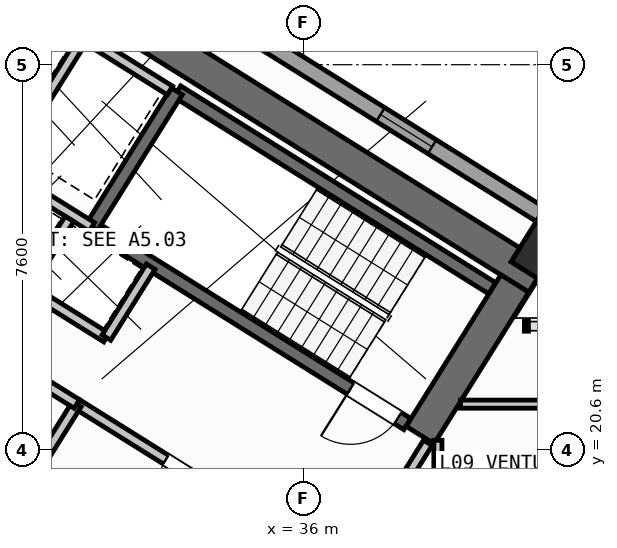
"""IFC4 building model, lengths in metres.
Left out: names, types, materials, properties, quantities, classifications, styles, units other than length and angle.
Written with IfcOpenShell. Run it as: python <this file> out.ifc"""

import sys

from ifc_helpers import new_model, si_unit, direction, frame, frame_2d, origin, origin_2d, place, context, subcontext, project, spatial, rectangle, hollow_rectangle, extrude, source, transform, mapped, element, fill, save


model = new_model("IFC4")
c1 = context("Model", 3, precision=1e-05, world=origin(), true_north=direction((0.0, 1.0)))
c2 = subcontext(c1, "Body", "Model", "MODEL_VIEW")
j1 = project(units=[si_unit("LENGTHUNIT", "METRE"), si_unit("PLANEANGLEUNIT", "RADIAN")], contexts=[c1])
p1 = place(None, origin())
s1 = spatial("IfcSite", under=j1, at=p1, CompositionType="ELEMENT")
p2 = place(p1, origin())
s2 = spatial("IfcBuilding", under=s1, at=p2, CompositionType="ELEMENT")
p3 = place(p2, frame((0.0, 0.0, 38.4)))
s3 = spatial("IfcBuildingStorey", under=s2, at=p3, CompositionType="ELEMENT", Elevation=38.4)
p4 = place(p3, frame((40.615, 23.983, 0.0), z_axis=(0.0, 0.0, 1.0), x_axis=(-0.848045953968, 0.529922692436, 0.0)))
e1 = element("IfcWall", 1, at=p4, inside=s3, PredefinedType="SHEAR", context=c2, shape_type="SweptSolid", body=[
    extrude(rectangle(XDim=13.24, YDim=0.65, at=frame_2d((6.62, 0.0))), origin(), (0.0, 0.0, 1.0), 3.35),
])
p5 = place(p3, frame((40.168, 23.88, 0.0), z_axis=(0.0, 0.0, 1.0), x_axis=(-0.529893103397, -0.8480644427, 0.0)))
e2 = element("IfcWall", 2, at=p5, inside=s3, PredefinedType="SHEAR", context=c2, shape_type="SweptSolid", body=[
    extrude(rectangle(XDim=3.525, YDim=0.65, at=frame_2d((1.763, 0.0))), origin(), (0.0, 0.0, 1.0), 3.35),
])
m1 = source(origin(), c2, "Body", "SweptSolid", [
    extrude(hollow_rectangle(XDim=1.0, YDim=1.0, WallThickness=0.04, at=origin_2d()), origin(), (0.0, 0.0, 1.0), 3.6),
])
p6 = place(p3, frame((40.783, 24.469, 0.0), z_axis=(0.0, 0.0, 1.0), x_axis=(-0.848048096156, 0.529919264233, 0.0)))
e3 = element("IfcColumn", 3, at=p6, inside=s3, PredefinedType="COLUMN", context=c2, shape_type="MappedRepresentation", body=[
    mapped(m1, transform((0.0, 0.0, 0.0), scale=1.0)),
])
p7 = place(p3, frame((14.138, 41.825, 0.0), z_axis=(0.0, 0.0, 1.0), x_axis=(0.848046498049, -0.529921821731, 0.0)))
e4 = element("IfcWall", 4, at=p7, inside=s3, PredefinedType="STANDARD", context=c2, shape_type="SweptSolid", body=[
    extrude(rectangle(XDim=31.588, YDim=0.32, at=frame_2d((15.794, 0.0))), origin(), (0.0, 0.0, 1.0), 3.35),
])
p8 = place(p7, frame((3.369, 0.0, 0.0)))
e5 = element("IfcOpeningElement", 5, at=p8, cuts=e4, PredefinedType="OPENING", context=c2, shape_type="SweptSolid", body=[
    extrude(rectangle(XDim=1.05, YDim=2.15, at=frame_2d((0.525, 1.075))), frame((0.0, 0.17, 0.0), z_axis=(0.0, -1.0, 0.0), x_axis=(1.0, 0.0, 0.0)), (0.0, 0.0, 1.0), 0.34),
])
p9 = place(p7, frame((0.946, 0.0, 0.85)))
e6 = element("IfcOpeningElement", 6, at=p9, cuts=e4, PredefinedType="OPENING", context=c2, shape_type="SweptSolid", body=[
    extrude(rectangle(XDim=1.8, YDim=1.5, at=frame_2d((0.9, 0.75))), frame((0.0, 0.17, 0.0), z_axis=(0.0, -1.0, 0.0), x_axis=(1.0, 0.0, 0.0)), (0.0, 0.0, 1.0), 0.34),
])
p10 = place(p7, frame((8.46, 0.0, 0.85)))
e7 = element("IfcOpeningElement", 7, at=p10, cuts=e4, PredefinedType="OPENING", context=c2, shape_type="SweptSolid", body=[
    extrude(rectangle(XDim=1.8, YDim=1.5, at=frame_2d((0.9, 0.75))), frame((0.0, 0.17, 0.0), z_axis=(0.0, -1.0, 0.0), x_axis=(1.0, 0.0, 0.0)), (0.0, 0.0, 1.0), 0.34),
])
p11 = place(p7, frame((13.899, 0.0, 0.85)))
e8 = element("IfcOpeningElement", 8, at=p11, cuts=e4, PredefinedType="OPENING", context=c2, shape_type="SweptSolid", body=[
    extrude(rectangle(XDim=1.5, YDim=1.5, at=frame_2d((0.75, 0.75))), frame((0.0, 0.17, 0.0), z_axis=(0.0, -1.0, 0.0), x_axis=(1.0, 0.0, 0.0)), (0.0, 0.0, 1.0), 0.34),
])
p12 = place(p7, frame((22.019, 0.0, 0.95)))
e9 = element("IfcOpeningElement", 9, at=p12, cuts=e4, PredefinedType="OPENING", context=c2, shape_type="SweptSolid", body=[
    extrude(rectangle(XDim=1.2, YDim=1.4, at=frame_2d((0.6, 0.7))), frame((0.0, 0.17, 0.0), z_axis=(0.0, -1.0, 0.0), x_axis=(1.0, 0.0, 0.0)), (0.0, 0.0, 1.0), 0.34),
])
p13 = place(p7, frame((27.569, 0.0, 0.95)))
e10 = element("IfcOpeningElement", 10, at=p13, cuts=e4, PredefinedType="OPENING", context=c2, shape_type="SweptSolid", body=[
    extrude(rectangle(XDim=1.2, YDim=1.4, at=frame_2d((0.6, 0.7))), frame((0.0, 0.17, 0.0), z_axis=(0.0, -1.0, 0.0), x_axis=(1.0, 0.0, 0.0)), (0.0, 0.0, 1.0), 0.34),
])
p14 = place(p3, frame((31.28, 18.261, 0.0), z_axis=(0.0, 0.0, 1.0), x_axis=(-0.848051618787, 0.529913626805, 0.0)))
e11 = element("IfcWall", 11, at=p14, inside=s3, PredefinedType="SHEAR", context=c2, shape_type="SweptSolid", body=[
    extrude(rectangle(XDim=7.46, YDim=0.26, at=frame_2d((3.73, 0.0))), origin(), (0.0, 0.0, 1.0), 3.35),
])
p15 = place(p14, frame((0.36, 0.0, 0.0)))
e12 = element("IfcOpeningElement", 12, at=p15, cuts=e11, PredefinedType="OPENING", context=c2, shape_type="SweptSolid", body=[
    extrude(rectangle(XDim=0.86, YDim=2.05, at=frame_2d((0.43, 1.025))), frame((0.0, 0.14, 0.0), z_axis=(0.0, -1.0, 0.0), x_axis=(1.0, 0.0, 0.0)), (0.0, 0.0, 1.0), 0.28),
])
p16 = place(p3, frame((39.721, 23.788, 0.0), z_axis=(0.0, 0.0, 1.0), x_axis=(-0.848054434086, 0.529909121291, 0.0)))
e13 = element("IfcWall", 13, at=p16, inside=s3, PredefinedType="SHEAR", context=c2, shape_type="SweptSolid", body=[
    extrude(rectangle(XDim=7.33, YDim=0.26, at=frame_2d((3.665, 0.0))), origin(), (0.0, 0.0, 1.0), 3.35),
])
p17 = place(p3, frame((38.046, 21.108, 0.0), z_axis=(0.0, 0.0, 1.0), x_axis=(-0.848054434086, 0.529909121291, 0.0)))
e14 = element("IfcWall", 14, at=p17, inside=s3, PredefinedType="SHEAR", context=c2, shape_type="SweptSolid", body=[
    extrude(rectangle(XDim=7.33, YDim=0.26, at=frame_2d((3.665, 0.0))), origin(), (0.0, 0.0, 1.0), 3.35),
])
p18 = place(p17, frame((0.22, 0.0, 0.0)))
e15 = element("IfcOpeningElement", 15, at=p18, cuts=e14, PredefinedType="OPENING", context=c2, shape_type="SweptSolid", body=[
    extrude(rectangle(XDim=1.1, YDim=2.1, at=frame_2d((0.55, 1.05))), frame((0.0, 0.14, 0.0), z_axis=(0.0, -1.0, 0.0), x_axis=(1.0, 0.0, 0.0)), (0.0, 0.0, 1.0), 0.28),
])
p19 = place(p3, frame((33.496, 27.677, 0.0), z_axis=(0.0, 0.0, 1.0), x_axis=(-0.529908658664, -0.84805472316, 0.0)))
e16 = element("IfcWall", 16, at=p19, inside=s3, PredefinedType="SHEAR", context=c2, shape_type="SweptSolid", body=[
    extrude(rectangle(XDim=3.16, YDim=0.26, at=frame_2d((1.58, 0.0))), origin(), (0.0, 0.0, 1.0), 3.35),
])
p20 = place(p3, frame((36.374, 18.474, 0.0), z_axis=(0.0, 0.0, 1.0), x_axis=(-0.848051071577, 0.529914502535, 0.0)))
e17 = element("IfcWall", 17, at=p20, inside=s3, PredefinedType="STANDARD", context=c2, shape_type="SweptSolid", body=[
    extrude(rectangle(XDim=5.718, YDim=0.2, at=frame_2d((2.859, 0.0))), origin(), (0.0, 0.0, 1.0), 3.34),
])
p21 = place(p20, frame((2.498, 0.0, 0.0)))
e18 = element("IfcOpeningElement", 18, at=p21, cuts=e17, PredefinedType="OPENING", context=c2, shape_type="SweptSolid", body=[
    extrude(rectangle(XDim=1.15, YDim=2.1, at=frame_2d((0.575, 1.05))), frame((0.0, 0.11, 0.0), z_axis=(0.0, -1.0, 0.0), x_axis=(1.0, 0.0, 0.0)), (0.0, 0.0, 1.0), 0.22),
])
p22 = place(p3, frame((31.822, 24.998, 0.0), z_axis=(0.0, 0.0, 1.0), x_axis=(-0.848058348634, 0.529902856485, 0.0)))
e19 = element("IfcWall", 19, at=p22, inside=s3, PredefinedType="STANDARD", context=c2, shape_type="SweptSolid", body=[
    extrude(rectangle(XDim=4.568, YDim=0.2, at=frame_2d((2.284, 0.0))), origin(), (0.0, 0.0, 1.0), 3.34),
])
p23 = place(p3, frame((32.108, 22.814, 0.0), z_axis=(0.0, 0.0, 1.0), x_axis=(-0.848042229521, 0.529928652696, 0.0)))
e20 = element("IfcWall", 20, at=p23, inside=s3, PredefinedType="STANDARD", context=c2, shape_type="SweptSolid", body=[
    extrude(rectangle(XDim=5.62, YDim=0.2, at=frame_2d((2.81, 0.0))), origin(), (0.0, 0.0, 1.0), 3.34),
])
p24 = place(p3, frame((32.982, 24.213, 0.0), z_axis=(0.0, 0.0, 1.0), x_axis=(-0.529839334948, -0.84809803628, 0.0)))
e21 = element("IfcWall", 21, at=p24, inside=s3, PredefinedType="STANDARD", context=c2, shape_type="SweptSolid", body=[
    extrude(rectangle(XDim=1.65, YDim=0.2, at=frame_2d((0.825, 0.0))), origin(), (0.0, 0.0, 1.0), 3.34),
])
p25 = place(p3, frame((31.645, 28.716, 0.0), z_axis=(0.0, 0.0, 1.0), x_axis=(-0.52986693015, -0.848080795876, 0.0)))
e22 = element("IfcWall", 22, at=p25, inside=s3, PredefinedType="STANDARD", context=c2, shape_type="SweptSolid", body=[
    extrude(rectangle(XDim=2.66, YDim=0.2, at=frame_2d((1.33, 0.0))), origin(), (0.0, 0.0, 1.0), 3.34),
])
p26 = place(p3, frame((33.363, 27.69, 0.0), z_axis=(0.0, 0.0, 1.0), x_axis=(-0.848053806312, 0.529910125964, 0.0)))
e23 = element("IfcWall", 23, at=p26, inside=s3, PredefinedType="STANDARD", context=c2, shape_type="SweptSolid", body=[
    extrude(rectangle(XDim=4.448, YDim=0.2, at=frame_2d((2.224, 0.0))), origin(), (0.0, 0.0, 1.0), 3.34),
])
p27 = place(p3, frame((31.379, 25.156, 0.0), z_axis=(0.0, 0.0, 1.0), x_axis=(-0.529998940003, -0.847998304005, 0.0)))
e24 = element("IfcWall", 24, at=p27, inside=s3, PredefinedType="STANDARD", context=c2, shape_type="SweptSolid", body=[
    extrude(rectangle(XDim=1.58, YDim=0.2, at=frame_2d((0.79, 0.0))), origin(), (0.0, 0.0, 1.0), 3.34),
])
p28 = place(p3, frame((31.525, 21.504, 0.0), z_axis=(0.0, 0.0, 1.0), x_axis=(-0.529907497854, -0.848055448493, 0.0)))
e25 = element("IfcWall", 25, at=p28, inside=s3, PredefinedType="STANDARD", context=c2, shape_type="SweptSolid", body=[
    extrude(rectangle(XDim=2.88, YDim=0.2, at=frame_2d((1.44, 0.0))), origin(), (0.0, 0.0, 1.0), 3.34),
])
p29 = place(p3, frame((31.525, 21.504, 0.0), z_axis=(0.0, 0.0, 1.0), x_axis=(-0.848044998614, 0.529924221305, 0.0)))
e26 = element("IfcWall", 26, at=p29, inside=s3, PredefinedType="STANDARD", context=c2, shape_type="SweptSolid", body=[
    extrude(rectangle(XDim=6.168, YDim=0.2, at=frame_2d((3.084, 0.0))), origin(), (0.0, 0.0, 1.0), 3.34),
])
p30 = place(p29, frame((4.4, 0.0, 0.0)))
e27 = element("IfcOpeningElement", 27, at=p30, cuts=e26, PredefinedType="OPENING", context=c2, shape_type="SweptSolid", body=[
    extrude(rectangle(XDim=0.86, YDim=2.05, at=frame_2d((0.43, 1.025))), frame((0.0, 0.11, 0.0), z_axis=(0.0, -1.0, 0.0), x_axis=(1.0, 0.0, 0.0)), (0.0, 0.0, 1.0), 0.22),
])
p31 = place(p29, frame((1.45, 0.0, 0.0)))
e28 = element("IfcOpeningElement", 28, at=p31, cuts=e26, PredefinedType="OPENING", context=c2, shape_type="SweptSolid", body=[
    extrude(rectangle(XDim=0.86, YDim=2.05, at=frame_2d((0.43, 1.025))), frame((0.0, 0.11, 0.0), z_axis=(0.0, -1.0, 0.0), x_axis=(1.0, 0.0, 0.0)), (0.0, 0.0, 1.0), 0.22),
])
p32 = place(p3, frame((38.451, 20.737, 0.0), z_axis=(0.0, 0.0, 1.0), x_axis=(-0.529924799939, -0.848044637038, 0.0)))
e29 = element("IfcWall", 29, at=p32, inside=s3, PredefinedType="STANDARD", context=c2, shape_type="SweptSolid", body=[
    extrude(rectangle(XDim=2.96, YDim=0.2, at=frame_2d((1.48, 0.0))), origin(), (0.0, 0.0, 1.0), 3.34),
])
p33 = place(p32, frame((1.46, 0.0, 0.0)))
e30 = element("IfcOpeningElement", 30, at=p33, cuts=e29, PredefinedType="OPENING", context=c2, shape_type="SweptSolid", body=[
    extrude(rectangle(XDim=0.86, YDim=2.05, at=frame_2d((0.43, 1.025))), frame((0.0, 0.11, 0.0), z_axis=(0.0, -1.0, 0.0), x_axis=(1.0, 0.0, 0.0)), (0.0, 0.0, 1.0), 0.22),
])
p34 = place(p3, frame((38.65, 17.93, 0.0), z_axis=(0.0, 0.0, 1.0), x_axis=(0.0, 1.0, 0.0)))
e31 = element("IfcWall", 31, at=p34, inside=s3, PredefinedType="PARTITIONING", context=c2, shape_type="SweptSolid", body=[
    extrude(rectangle(XDim=2.857, YDim=0.16, at=frame_2d((1.428, 0.0))), origin(), (0.0, 0.0, 1.0), 3.34),
])
p35 = place(p3, frame((39.095, 21.5, 0.0), z_axis=(0.0, 0.0, 1.0), x_axis=(1.0, 0.0, 0.0)))
e32 = element("IfcWall", 32, at=p35, inside=s3, PredefinedType="PARTITIONING", context=c2, shape_type="SweptSolid", body=[
    extrude(rectangle(XDim=7.094, YDim=0.16, at=frame_2d((3.547, 0.0))), origin(), (0.0, 0.0, 1.0), 3.34),
])
m2 = source(origin(), c2, "Body", "SweptSolid", [
    extrude(rectangle(XDim=1.2, YDim=1.4, at=frame_2d((0.6, 0.7))), frame((0.0, 0.03, 0.0), z_axis=(0.0, -1.0, 0.0), x_axis=(1.0, 0.0, 0.0)), (0.0, 0.0, 1.0), 0.06),
])
p36 = place(p13, origin())
e33 = element("IfcWindow", 33, at=p36, inside=s3, PartitioningType="SINGLE_PANEL", PredefinedType="WINDOW", context=c2, shape_type="MappedRepresentation", body=[
    mapped(m2, transform((0.0, 0.0, 0.0), scale=1.0)),
])
fill(e10, e33)
m3 = source(origin(), c2, "Body", "SweptSolid", [
    extrude(rectangle(XDim=1.1, YDim=2.1, at=frame_2d((0.55, 1.05))), frame((0.0, 0.025, 0.0), z_axis=(0.0, -1.0, 0.0), x_axis=(1.0, 0.0, 0.0)), (0.0, 0.0, 1.0), 0.05),
])
p37 = place(p18, origin())
e34 = element("IfcDoor", 34, at=p37, inside=s3, OperationType="SINGLE_SWING_RIGHT", PredefinedType="DOOR", context=c2, shape_type="MappedRepresentation", body=[
    mapped(m3, transform((0.0, 0.0, 0.0), scale=1.0)),
])
fill(e15, e34)
m4 = source(origin(), c2, "Body", "SweptSolid", [
    extrude(rectangle(XDim=1.15, YDim=2.1, at=frame_2d((0.575, 1.05))), frame((0.0, 0.025, 0.0), z_axis=(0.0, -1.0, 0.0), x_axis=(1.0, 0.0, 0.0)), (0.0, 0.0, 1.0), 0.05),
])
p38 = place(p21, origin())
e35 = element("IfcDoor", 35, at=p38, inside=s3, OperationType="SINGLE_SWING_LEFT", PredefinedType="DOOR", context=c2, shape_type="MappedRepresentation", body=[
    mapped(m4, transform((0.0, 0.0, 0.0), scale=1.0)),
])
fill(e18, e35)
save(model, sys.argv[1])
